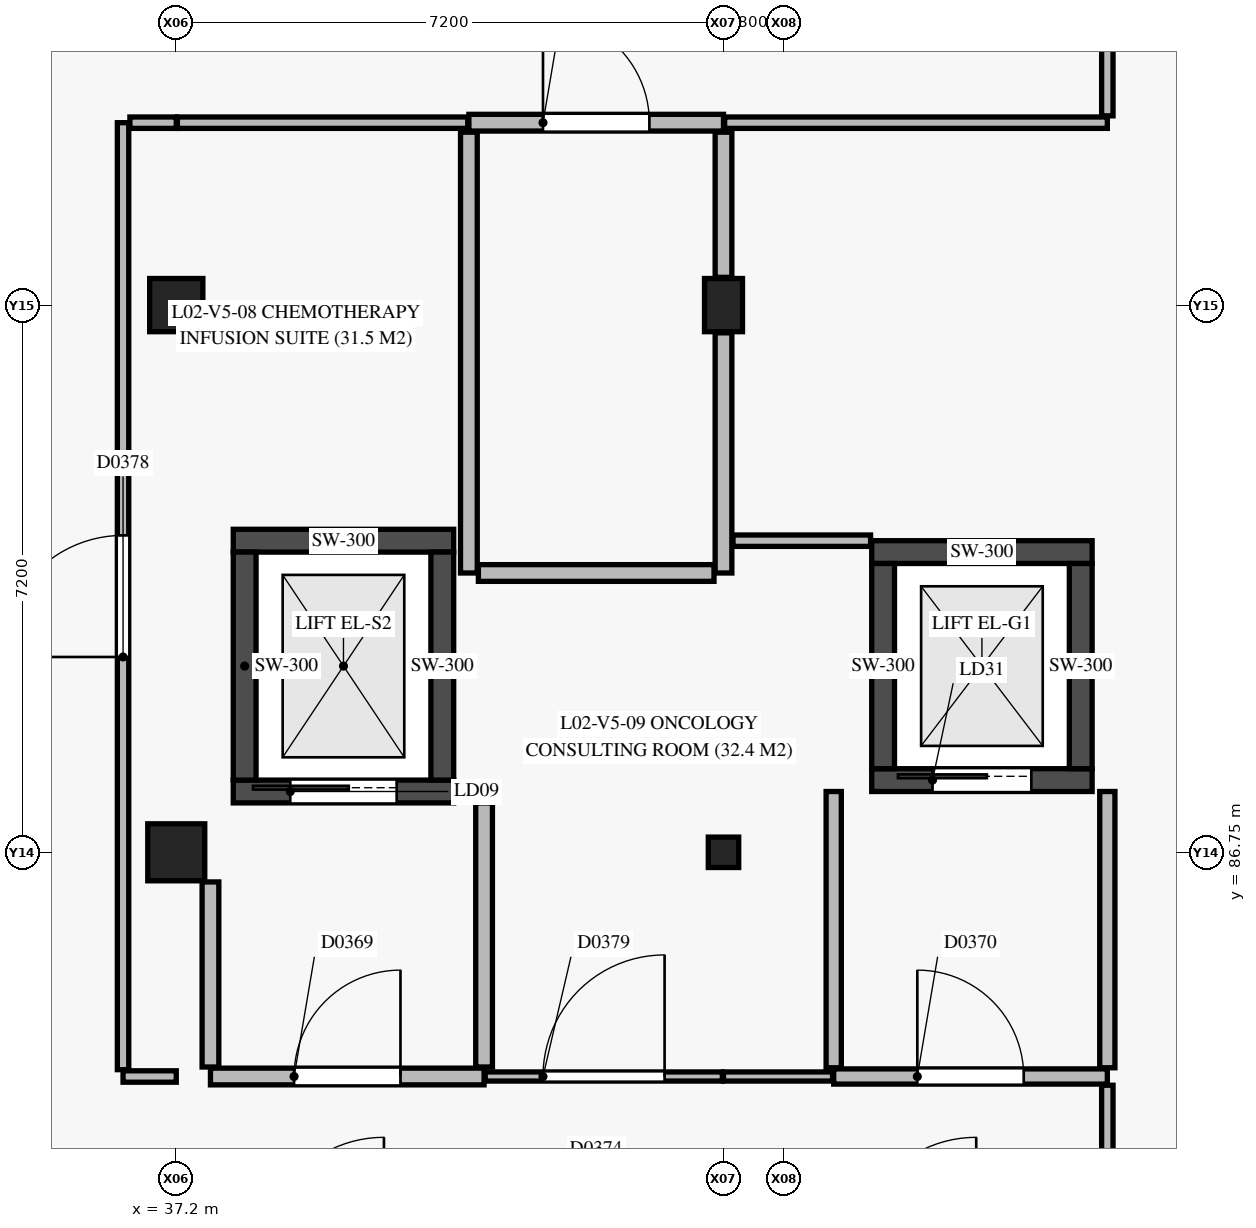
"""IFC4 building model, lengths in metres.
Left out: names, types, materials, properties, quantities, classifications, styles, units other than length and angle.
Written with IfcOpenShell. Run it as: python <this file> out.ifc"""

import sys

from ifc_helpers import new_model, si_unit, direction, frame, frame_2d, origin, origin_2d, place, context, subcontext, project, spatial, rectangle, extrude, element, fill, save


model = new_model("IFC4")
c1 = context("Model", 3, precision=1e-05, world=origin(), true_north=direction((0.0, 1.0)))
c2 = subcontext(c1, "Body", "Model", "MODEL_VIEW")
j1 = project(units=[si_unit("LENGTHUNIT", "METRE"), si_unit("PLANEANGLEUNIT", "RADIAN")], contexts=[c1])
p1 = place(None, origin())
s1 = spatial("IfcSite", under=j1, at=p1, CompositionType="ELEMENT")
p2 = place(p1, origin())
s2 = spatial("IfcBuilding", under=s1, at=p2, CompositionType="ELEMENT")
p3 = place(p2, frame((0.0, 0.0, 9.0)))
s3 = spatial("IfcBuildingStorey", under=s2, at=p3, CompositionType="ELEMENT", Elevation=9.0)
p4 = place(p3, frame((37.2, 86.75, 0.0), z_axis=(0.0, 0.0, 1.0), x_axis=(1.0, 0.0, 0.0)))
e1 = element("IfcColumn", 1, at=p4, inside=s3, PredefinedType="COLUMN", context=c2, shape_type="SweptSolid", body=[
    extrude(rectangle(XDim=0.75, YDim=0.75, at=origin_2d()), origin(), (0.0, 0.0, 1.0), 4.2),
])
p5 = place(p3, frame((37.2, 93.95, 0.0), z_axis=(0.0, 0.0, 1.0), x_axis=(1.0, 0.0, 0.0)))
e2 = element("IfcColumn", 2, at=p5, inside=s3, PredefinedType="COLUMN", context=c2, shape_type="SweptSolid", body=[
    extrude(rectangle(XDim=0.7, YDim=0.7, at=origin_2d()), origin(), (0.0, 0.0, 1.0), 4.2),
])
p6 = place(p3, frame((44.4, 86.75, 0.0), z_axis=(0.0, 0.0, 1.0), x_axis=(1.0, 0.0, 0.0)))
e3 = element("IfcColumn", 3, at=p6, inside=s3, PredefinedType="COLUMN", context=c2, shape_type="SweptSolid", body=[
    extrude(rectangle(XDim=0.4, YDim=0.4, at=origin_2d()), origin(), (0.0, 0.0, 1.0), 4.2),
])
p7 = place(p3, frame((44.4, 93.95, 0.0), z_axis=(0.0, 0.0, 1.0), x_axis=(1.0, 0.0, 0.0)))
e4 = element("IfcColumn", 4, at=p7, inside=s3, PredefinedType="COLUMN", context=c2, shape_type="SweptSolid", body=[
    extrude(rectangle(XDim=0.5, YDim=0.7, at=origin_2d()), origin(), (0.0, 0.0, 1.0), 4.2),
])
p8 = place(p3, frame((37.95, 87.55, 0.0), z_axis=(0.0, 0.0, 1.0), x_axis=(1.0, 0.0, 0.0)))
e5 = element("IfcWall", 5, at=p8, inside=s3, PredefinedType="SHEAR", context=c2, shape_type="SweptSolid", body=[
    extrude(rectangle(XDim=2.9, YDim=0.3, at=frame_2d((1.45, 0.0))), origin(), (0.0, 0.0, 1.0), 3.95),
])
p9 = place(p8, frame((0.75, 0.0, 0.0)))
e6 = element("IfcOpeningElement", 6, at=p9, cuts=e5, PredefinedType="OPENING", context=c2, shape_type="SweptSolid", body=[
    extrude(rectangle(XDim=1.4, YDim=2.15, at=frame_2d((0.7, 1.075))), frame((0.0, 0.16, 0.0), z_axis=(0.0, -1.0, 0.0), x_axis=(1.0, 0.0, 0.0)), (0.0, 0.0, 1.0), 0.32),
])
p10 = place(p3, frame((37.95, 90.85, 0.0), z_axis=(0.0, 0.0, 1.0), x_axis=(1.0, 0.0, 0.0)))
e7 = element("IfcWall", 7, at=p10, inside=s3, PredefinedType="SHEAR", context=c2, shape_type="SweptSolid", body=[
    extrude(rectangle(XDim=2.9, YDim=0.3, at=frame_2d((1.45, 0.0))), origin(), (0.0, 0.0, 1.0), 3.95),
])
for number, where, z_axis, x_axis in (
    (8, (38.1, 87.7, 0.0), (0.0, 0.0, 1.0), (0.0, 1.0, 0.0)),
    (9, (40.7, 87.7, 0.0), (0.0, 0.0, 1.0), (0.0, 1.0, 0.0)),
):
    element("IfcWall", number, at=place(p3, frame(where, z_axis=z_axis, x_axis=x_axis)), inside=s3, PredefinedType="SHEAR", context=c2, shape_type="SweptSolid", body=[
        extrude(rectangle(XDim=3.0, YDim=0.3, at=frame_2d((1.5, 0.0))), origin(), (0.0, 0.0, 1.0), 3.95),
    ])
p11 = place(p3, frame((46.35, 87.7, 0.0), z_axis=(0.0, 0.0, 1.0), x_axis=(1.0, 0.0, 0.0)))
e10 = element("IfcWall", 10, at=p11, inside=s3, PredefinedType="SHEAR", context=c2, shape_type="SweptSolid", body=[
    extrude(rectangle(XDim=2.9, YDim=0.3, at=frame_2d((1.45, 0.0))), origin(), (0.0, 0.0, 1.0), 3.95),
])
p12 = place(p11, frame((0.8, 0.0, 0.0)))
e11 = element("IfcOpeningElement", 11, at=p12, cuts=e10, PredefinedType="OPENING", context=c2, shape_type="SweptSolid", body=[
    extrude(rectangle(XDim=1.3, YDim=2.15, at=frame_2d((0.65, 1.075))), frame((0.0, 0.16, 0.0), z_axis=(0.0, -1.0, 0.0), x_axis=(1.0, 0.0, 0.0)), (0.0, 0.0, 1.0), 0.32),
])
p13 = place(p3, frame((46.35, 90.7, 0.0), z_axis=(0.0, 0.0, 1.0), x_axis=(1.0, 0.0, 0.0)))
e12 = element("IfcWall", 12, at=p13, inside=s3, PredefinedType="SHEAR", context=c2, shape_type="SweptSolid", body=[
    extrude(rectangle(XDim=2.9, YDim=0.3, at=frame_2d((1.45, 0.0))), origin(), (0.0, 0.0, 1.0), 3.95),
])
for number, where, z_axis, x_axis in (
    (13, (46.5, 87.85, 0.0), (0.0, 0.0, 1.0), (0.0, 1.0, 0.0)),
    (14, (49.1, 87.85, 0.0), (0.0, 0.0, 1.0), (0.0, 1.0, 0.0)),
):
    element("IfcWall", number, at=place(p3, frame(where, z_axis=z_axis, x_axis=x_axis)), inside=s3, PredefinedType="SHEAR", context=c2, shape_type="SweptSolid", body=[
        extrude(rectangle(XDim=2.7, YDim=0.3, at=frame_2d((1.35, 0.0))), origin(), (0.0, 0.0, 1.0), 3.95),
    ])
p14 = place(p3, frame((37.65, 83.8, 0.0), z_axis=(0.0, 0.0, 1.0), x_axis=(1.0, 0.0, 0.0)))
e15 = element("IfcWall", 15, at=p14, inside=s3, PredefinedType="PARTITIONING", context=c2, shape_type="SweptSolid", body=[
    extrude(rectangle(XDim=3.6, YDim=0.22, at=frame_2d((1.8, 0.0))), origin(), (0.0, 0.0, 1.0), 3.95),
])
p15 = place(p14, frame((1.1, 0.0, 0.0)))
e16 = element("IfcOpeningElement", 16, at=p15, cuts=e15, PredefinedType="OPENING", context=c2, shape_type="SweptSolid", body=[
    extrude(rectangle(XDim=1.4, YDim=2.2, at=frame_2d((0.7, 1.1))), frame((0.0, 0.12, 0.0), z_axis=(0.0, -1.0, 0.0), x_axis=(1.0, 0.0, 0.0)), (0.0, 0.0, 1.0), 0.24),
])
p16 = place(p3, frame((45.85, 83.8, 0.0), z_axis=(0.0, 0.0, 1.0), x_axis=(1.0, 0.0, 0.0)))
e17 = element("IfcWall", 17, at=p16, inside=s3, PredefinedType="PARTITIONING", context=c2, shape_type="SweptSolid", body=[
    extrude(rectangle(XDim=3.6, YDim=0.2, at=frame_2d((1.8, 0.0))), origin(), (0.0, 0.0, 1.0), 3.95),
])
p17 = place(p16, frame((1.1, 0.0, 0.0)))
e18 = element("IfcOpeningElement", 18, at=p17, cuts=e17, PredefinedType="OPENING", context=c2, shape_type="SweptSolid", body=[
    extrude(rectangle(XDim=1.4, YDim=2.2, at=frame_2d((0.7, 1.1))), frame((0.0, 0.11, 0.0), z_axis=(0.0, -1.0, 0.0), x_axis=(1.0, 0.0, 0.0)), (0.0, 0.0, 1.0), 0.22),
])
p18 = place(p3, frame((41.25, 83.925, 0.0), z_axis=(0.0, 0.0, 1.0), x_axis=(0.0, 1.0, 0.0)))
e19 = element("IfcWall", 19, at=p18, inside=s3, PredefinedType="PARTITIONING", context=c2, shape_type="SweptSolid", body=[
    extrude(rectangle(XDim=3.475, YDim=0.22, at=frame_2d((1.737, 0.0))), origin(), (0.0, 0.0, 1.0), 3.235),
])
p19 = place(p3, frame((37.65, 83.925, 0.0), z_axis=(0.0, 0.0, 1.0), x_axis=(0.0, 1.0, 0.0)))
e20 = element("IfcWall", 20, at=p19, inside=s3, PredefinedType="PARTITIONING", context=c2, shape_type="SweptSolid", body=[
    extrude(rectangle(XDim=2.435, YDim=0.22, at=frame_2d((1.218, 0.0))), origin(), (0.0, 0.0, 1.0), 3.475),
])
for number, where, z_axis, x_axis in (
    (21, (49.45, 83.915, 0.0), (0.0, 0.0, 1.0), (0.0, 1.0, 0.0)),
    (22, (45.85, 83.915, 0.0), (0.0, 0.0, 1.0), (0.0, 1.0, 0.0)),
):
    element("IfcWall", number, at=place(p3, frame(where, z_axis=z_axis, x_axis=x_axis)), inside=s3, PredefinedType="PARTITIONING", context=c2, shape_type="SweptSolid", body=[
        extrude(rectangle(XDim=3.635, YDim=0.2, at=frame_2d((1.817, 0.0))), origin(), (0.0, 0.0, 1.0), 3.355),
    ])
p20 = place(p3, frame((41.05, 96.35, 0.0), z_axis=(0.0, 0.0, 1.0), x_axis=(1.0, 0.0, 0.0)))
e23 = element("IfcWall", 23, at=p20, inside=s3, PredefinedType="PARTITIONING", context=c2, shape_type="SweptSolid", body=[
    extrude(rectangle(XDim=3.35, YDim=0.22, at=frame_2d((1.675, 0.0))), origin(), (0.0, 0.0, 1.0), 3.355),
])
p21 = place(p20, frame((0.975, 0.0, 0.0)))
e24 = element("IfcOpeningElement", 24, at=p21, cuts=e23, PredefinedType="OPENING", context=c2, shape_type="SweptSolid", body=[
    extrude(rectangle(XDim=1.4, YDim=2.2, at=frame_2d((0.7, 1.1))), frame((0.0, 0.12, 0.0), z_axis=(0.0, -1.0, 0.0), x_axis=(1.0, 0.0, 0.0)), (0.0, 0.0, 1.0), 0.24),
])
p22 = place(p3, frame((44.415, 96.35, 0.0), z_axis=(0.0, 0.0, 1.0), x_axis=(1.0, 0.0, 0.0)))
e25 = element("IfcWall", 25, at=p22, inside=s3, PredefinedType="PARTITIONING", context=c2, shape_type="SweptSolid", body=[
    extrude(rectangle(XDim=5.035, YDim=0.15, at=frame_2d((2.518, 0.0))), origin(), (0.0, 0.0, 1.0), 3.355),
])
p23 = place(p3, frame((49.45, 96.44, 0.0), z_axis=(0.0, 0.0, 1.0), x_axis=(0.0, 1.0, 0.0)))
e26 = element("IfcWall", 26, at=p23, inside=s3, PredefinedType="PARTITIONING", context=c2, shape_type="SweptSolid", body=[
    extrude(rectangle(XDim=2.31, YDim=0.15, at=frame_2d((1.155, 0.0))), origin(), (0.0, 0.0, 1.0), 3.515),
])
p24 = place(p3, frame((49.45, 81.49, 0.0), z_axis=(0.0, 0.0, 1.0), x_axis=(0.0, 1.0, 0.0)))
e27 = element("IfcWall", 27, at=p24, inside=s3, PredefinedType="PARTITIONING", context=c2, shape_type="SweptSolid", body=[
    extrude(rectangle(XDim=2.195, YDim=0.15, at=frame_2d((1.098, 0.0))), origin(), (0.0, 0.0, 1.0), 3.475),
])
p25 = place(p3, frame((36.5, 83.8, 0.0), z_axis=(0.0, 0.0, 1.0), x_axis=(1.0, 0.0, 0.0)))
e28 = element("IfcWall", 28, at=p25, inside=s3, PredefinedType="PARTITIONING", context=c2, shape_type="SweptSolid", body=[
    extrude(rectangle(XDim=0.7, YDim=0.15, at=frame_2d((0.35, 0.0))), origin(), (0.0, 0.0, 1.0), 3.355),
])
p26 = place(p3, frame((36.5, 83.89, 0.0), z_axis=(0.0, 0.0, 1.0), x_axis=(0.0, 1.0, 0.0)))
e29 = element("IfcWall", 29, at=p26, inside=s3, PredefinedType="PARTITIONING", context=c2, shape_type="SweptSolid", body=[
    extrude(rectangle(XDim=12.46, YDim=0.15, at=frame_2d((6.23, 0.0))), origin(), (0.0, 0.0, 1.0), 3.135),
])
p27 = place(p26, frame((5.43, 0.0, 0.0)))
e30 = element("IfcOpeningElement", 30, at=p27, cuts=e29, PredefinedType="OPENING", context=c2, shape_type="SweptSolid", body=[
    extrude(rectangle(XDim=1.6, YDim=2.25, at=frame_2d((0.8, 1.125))), frame((0.0, 0.085, 0.0), z_axis=(0.0, -1.0, 0.0), x_axis=(1.0, 0.0, 0.0)), (0.0, 0.0, 1.0), 0.17),
])
p28 = place(p3, frame((36.59, 96.35, 0.0), z_axis=(0.0, 0.0, 1.0), x_axis=(1.0, 0.0, 0.0)))
e31 = element("IfcWall", 31, at=p28, inside=s3, PredefinedType="PARTITIONING", context=c2, shape_type="SweptSolid", body=[
    extrude(rectangle(XDim=0.61, YDim=0.15, at=frame_2d((0.305, 0.0))), origin(), (0.0, 0.0, 1.0), 3.385),
])
p29 = place(p3, frame((37.215, 96.35, 0.0), z_axis=(0.0, 0.0, 1.0), x_axis=(1.0, 0.0, 0.0)))
e32 = element("IfcWall", 32, at=p29, inside=s3, PredefinedType="PARTITIONING", context=c2, shape_type="SweptSolid", body=[
    extrude(rectangle(XDim=3.82, YDim=0.15, at=frame_2d((1.91, 0.0))), origin(), (0.0, 0.0, 1.0), 3.385),
])
p30 = place(p3, frame((44.4, 83.8, 0.0), z_axis=(0.0, 0.0, 1.0), x_axis=(1.0, 0.0, 0.0)))
e33 = element("IfcWall", 33, at=p30, inside=s3, PredefinedType="PARTITIONING", context=c2, shape_type="SweptSolid", body=[
    extrude(rectangle(XDim=1.435, YDim=0.12, at=frame_2d((0.718, 0.0))), origin(), (0.0, 0.0, 1.0), 3.135),
])
p31 = place(p3, frame((41.265, 83.8, 0.0), z_axis=(0.0, 0.0, 1.0), x_axis=(1.0, 0.0, 0.0)))
e34 = element("IfcWall", 34, at=p31, inside=s3, PredefinedType="PARTITIONING", context=c2, shape_type="SweptSolid", body=[
    extrude(rectangle(XDim=3.12, YDim=0.12, at=frame_2d((1.56, 0.0))), origin(), (0.0, 0.0, 1.0), 3.135),
])
p32 = place(p31, frame((0.76, 0.0, 0.0)))
e35 = element("IfcOpeningElement", 35, at=p32, cuts=e34, PredefinedType="OPENING", context=c2, shape_type="SweptSolid", body=[
    extrude(rectangle(XDim=1.6, YDim=2.25, at=frame_2d((0.8, 1.125))), frame((0.0, 0.07, 0.0), z_axis=(0.0, -1.0, 0.0), x_axis=(1.0, 0.0, 0.0)), (0.0, 0.0, 1.0), 0.14),
])
p33 = place(p3, frame((44.4, 90.425, 0.0), z_axis=(0.0, 0.0, 1.0), x_axis=(0.0, 1.0, 0.0)))
e36 = element("IfcWall", 36, at=p33, inside=s3, PredefinedType="PARTITIONING", context=c2, shape_type="SweptSolid", body=[
    extrude(rectangle(XDim=3.16, YDim=0.22, at=frame_2d((1.58, 0.0))), origin(), (0.0, 0.0, 1.0), 3.235),
])
p34 = place(p3, frame((44.4, 94.315, 0.0), z_axis=(0.0, 0.0, 1.0), x_axis=(0.0, 1.0, 0.0)))
e37 = element("IfcWall", 37, at=p34, inside=s3, PredefinedType="PARTITIONING", context=c2, shape_type="SweptSolid", body=[
    extrude(rectangle(XDim=1.91, YDim=0.22, at=frame_2d((0.955, 0.0))), origin(), (0.0, 0.0, 1.0), 3.355),
])
p35 = place(p3, frame((41.05, 90.425, 0.0), z_axis=(0.0, 0.0, 1.0), x_axis=(0.0, 1.0, 0.0)))
e38 = element("IfcWall", 38, at=p35, inside=s3, PredefinedType="PARTITIONING", context=c2, shape_type="SweptSolid", body=[
    extrude(rectangle(XDim=5.8, YDim=0.22, at=frame_2d((2.9, 0.0))), origin(), (0.0, 0.0, 1.0), 3.355),
])
p36 = place(p3, frame((41.175, 90.425, 0.0), z_axis=(0.0, 0.0, 1.0), x_axis=(1.0, 0.0, 0.0)))
e39 = element("IfcWall", 39, at=p36, inside=s3, PredefinedType="PARTITIONING", context=c2, shape_type="SweptSolid", body=[
    extrude(rectangle(XDim=3.1, YDim=0.22, at=frame_2d((1.55, 0.0))), origin(), (0.0, 0.0, 1.0), 3.95),
])
p37 = place(p3, frame((44.525, 90.85, 0.0), z_axis=(0.0, 0.0, 1.0), x_axis=(1.0, 0.0, 0.0)))
e40 = element("IfcWall", 40, at=p37, inside=s3, PredefinedType="PARTITIONING", context=c2, shape_type="SweptSolid", body=[
    extrude(rectangle(XDim=1.81, YDim=0.15, at=frame_2d((0.905, 0.0))), origin(), (0.0, 0.0, 1.0), 3.95),
])
p38 = place(p9, origin())
e41 = element("IfcDoor", 41, at=p38, inside=s3, OperationType="SLIDING_TO_LEFT", PredefinedType="DOOR", context=c2, shape_type="SweptSolid", body=[
    extrude(rectangle(XDim=1.4, YDim=2.15, at=frame_2d((0.7, 1.075))), frame((0.0, 0.025, 0.0), z_axis=(0.0, -1.0, 0.0), x_axis=(1.0, 0.0, 0.0)), (0.0, 0.0, 1.0), 0.05),
])
fill(e6, e41)
p39 = place(p12, origin())
e42 = element("IfcDoor", 42, at=p39, inside=s3, OperationType="SLIDING_TO_LEFT", PredefinedType="DOOR", context=c2, shape_type="SweptSolid", body=[
    extrude(rectangle(XDim=1.3, YDim=2.15, at=frame_2d((0.65, 1.075))), frame((0.0, 0.025, 0.0), z_axis=(0.0, -1.0, 0.0), x_axis=(1.0, 0.0, 0.0)), (0.0, 0.0, 1.0), 0.05),
])
fill(e11, e42)
p40 = place(p15, origin())
e43 = element("IfcDoor", 43, at=p40, inside=s3, OperationType="SINGLE_SWING_RIGHT", PredefinedType="DOOR", context=c2, shape_type="SweptSolid", body=[
    extrude(rectangle(XDim=1.4, YDim=2.2, at=frame_2d((0.7, 1.1))), frame((0.0, 0.025, 0.0), z_axis=(0.0, -1.0, 0.0), x_axis=(1.0, 0.0, 0.0)), (0.0, 0.0, 1.0), 0.05),
])
fill(e16, e43)
p41 = place(p17, origin())
e44 = element("IfcDoor", 44, at=p41, inside=s3, OperationType="SINGLE_SWING_LEFT", PredefinedType="DOOR", context=c2, shape_type="SweptSolid", body=[
    extrude(rectangle(XDim=1.4, YDim=2.2, at=frame_2d((0.7, 1.1))), frame((0.0, 0.025, 0.0), z_axis=(0.0, -1.0, 0.0), x_axis=(1.0, 0.0, 0.0)), (0.0, 0.0, 1.0), 0.05),
])
fill(e18, e44)
p42 = place(p27, origin())
e45 = element("IfcDoor", 45, at=p42, inside=s3, OperationType="SINGLE_SWING_LEFT", PredefinedType="DOOR", context=c2, shape_type="SweptSolid", body=[
    extrude(rectangle(XDim=1.6, YDim=2.25, at=frame_2d((0.8, 1.125))), frame((0.0, 0.025, 0.0), z_axis=(0.0, -1.0, 0.0), x_axis=(1.0, 0.0, 0.0)), (0.0, 0.0, 1.0), 0.05),
])
fill(e30, e45)
p43 = place(p32, origin())
e46 = element("IfcDoor", 46, at=p43, inside=s3, OperationType="SINGLE_SWING_RIGHT", PredefinedType="DOOR", context=c2, shape_type="SweptSolid", body=[
    extrude(rectangle(XDim=1.6, YDim=2.25, at=frame_2d((0.8, 1.125))), frame((0.0, 0.025, 0.0), z_axis=(0.0, -1.0, 0.0), x_axis=(1.0, 0.0, 0.0)), (0.0, 0.0, 1.0), 0.05),
])
fill(e35, e46)
p44 = place(p21, origin())
e47 = element("IfcDoor", 47, at=p44, inside=s3, OperationType="SINGLE_SWING_LEFT", PredefinedType="DOOR", context=c2, shape_type="SweptSolid", body=[
    extrude(rectangle(XDim=1.4, YDim=2.2, at=frame_2d((0.7, 1.1))), frame((0.0, 0.025, 0.0), z_axis=(0.0, -1.0, 0.0), x_axis=(1.0, 0.0, 0.0)), (0.0, 0.0, 1.0), 0.05),
])
fill(e24, e47)
save(model, sys.argv[1])
